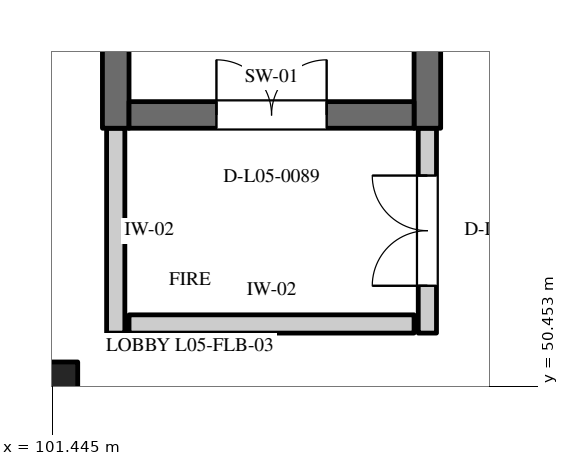
"""IFC4 building model, lengths in metres.
Left out: names, types, materials, properties, quantities, classifications, styles, units other than length and angle.
Written with IfcOpenShell. Run it as: python <this file> out.ifc"""

import sys

from ifc_helpers import new_model, si_unit, direction, frame, frame_2d, origin, origin_2d, place, context, subcontext, project, spatial, rectangle, extrude, element, fill, save


model = new_model("IFC4")
c1 = context("Model", 3, precision=1e-05, world=origin(), true_north=direction((0.0, 1.0)))
c2 = subcontext(c1, "Body", "Model", "MODEL_VIEW")
j1 = project(units=[si_unit("LENGTHUNIT", "METRE"), si_unit("PLANEANGLEUNIT", "RADIAN")], contexts=[c1])
p1 = place(None, origin())
s1 = spatial("IfcSite", under=j1, at=p1, CompositionType="ELEMENT")
p2 = place(p1, origin())
s2 = spatial("IfcBuilding", under=s1, at=p2, CompositionType="ELEMENT")
p3 = place(p2, frame((0.0, 0.0, 22.2)))
s3 = spatial("IfcBuildingStorey", under=s2, at=p3, CompositionType="ELEMENT", Elevation=22.2)
p4 = place(p3, frame((101.4, 50.4, 0.0), z_axis=(0.0, 0.0, 1.0), x_axis=(1.0, 0.0, 0.0)))
e1 = element("IfcColumn", 1, at=p4, inside=s3, PredefinedType="COLUMN", context=c2, shape_type="SweptSolid", body=[
    extrude(rectangle(XDim=0.75, YDim=0.75, at=origin_2d()), origin(), (0.0, 0.0, 1.0), 3.9),
])
for number, where, z_axis, x_axis in (
    (2, (102.275, 53.85, 0.0), (0.0, 0.0, 1.0), (0.0, 1.0, 0.0)),
    (3, (106.375, 53.85, 0.0), (0.0, 0.0, 1.0), (0.0, 1.0, 0.0)),
):
    element("IfcWall", number, at=place(p3, frame(where, z_axis=z_axis, x_axis=x_axis)), inside=s3, PredefinedType="SHEAR", context=c2, shape_type="SweptSolid", body=[
        extrude(rectangle(XDim=10.5, YDim=0.35, at=frame_2d((5.25, 0.0))), origin(), (0.0, 0.0, 1.0), 3.9),
    ])
p5 = place(p3, frame((102.45, 54.025, 0.0), z_axis=(0.0, 0.0, 1.0), x_axis=(1.0, 0.0, 0.0)))
e4 = element("IfcWall", 4, at=p5, inside=s3, PredefinedType="SHEAR", context=c2, shape_type="SweptSolid", body=[
    extrude(rectangle(XDim=3.75, YDim=0.35, at=frame_2d((1.875, 0.0))), origin(), (0.0, 0.0, 1.0), 3.6),
])
p6 = place(p5, frame((1.15, 0.0, 0.0)))
e5 = element("IfcOpeningElement", 5, at=p6, cuts=e4, PredefinedType="OPENING", context=c2, shape_type="SweptSolid", body=[
    extrude(rectangle(XDim=1.45, YDim=2.2, at=frame_2d((0.725, 1.1))), frame((0.0, 0.187, 0.0), z_axis=(0.0, -1.0, 0.0), x_axis=(1.0, 0.0, 0.0)), (0.0, 0.0, 1.0), 0.374),
])
p7 = place(p3, frame((102.275, 51.155, 0.0), z_axis=(0.0, 0.0, 1.0), x_axis=(0.0, 1.0, 0.0)))
e6 = element("IfcWall", 6, at=p7, inside=s3, PredefinedType="STANDARD", context=c2, shape_type="SweptSolid", body=[
    extrude(rectangle(XDim=2.695, YDim=0.24, at=frame_2d((1.348, 0.0))), origin(), (0.0, 0.0, 1.0), 3.6),
])
p8 = place(p3, frame((106.375, 51.155, 0.0), z_axis=(0.0, 0.0, 1.0), x_axis=(0.0, 1.0, 0.0)))
e7 = element("IfcWall", 7, at=p8, inside=s3, PredefinedType="STANDARD", context=c2, shape_type="SweptSolid", body=[
    extrude(rectangle(XDim=2.695, YDim=0.24, at=frame_2d((1.348, 0.0))), origin(), (0.0, 0.0, 1.0), 3.6),
])
p9 = place(p8, frame((0.623, 0.0, 0.0)))
e8 = element("IfcOpeningElement", 8, at=p9, cuts=e7, PredefinedType="OPENING", context=c2, shape_type="SweptSolid", body=[
    extrude(rectangle(XDim=1.45, YDim=2.2, at=frame_2d((0.725, 1.1))), frame((0.0, 0.132, 0.0), z_axis=(0.0, -1.0, 0.0), x_axis=(1.0, 0.0, 0.0)), (0.0, 0.0, 1.0), 0.264),
])
p10 = place(p3, frame((102.45, 51.275, 0.0), z_axis=(0.0, 0.0, 1.0), x_axis=(1.0, 0.0, 0.0)))
e9 = element("IfcWall", 9, at=p10, inside=s3, PredefinedType="STANDARD", context=c2, shape_type="SweptSolid", body=[
    extrude(rectangle(XDim=3.75, YDim=0.24, at=frame_2d((1.875, 0.0))), origin(), (0.0, 0.0, 1.0), 3.6),
])
p11 = place(p6, origin())
e10 = element("IfcDoor", 10, at=p11, inside=s3, OperationType="DOUBLE_DOOR_SINGLE_SWING", PredefinedType="DOOR", context=c2, shape_type="SweptSolid", body=[
    extrude(rectangle(XDim=1.45, YDim=2.2, at=frame_2d((0.725, 1.1))), frame((0.0, 0.025, 0.0), z_axis=(0.0, -1.0, 0.0), x_axis=(1.0, 0.0, 0.0)), (0.0, 0.0, 1.0), 0.05),
])
fill(e5, e10)
p12 = place(p9, origin())
e11 = element("IfcDoor", 11, at=p12, inside=s3, OperationType="DOUBLE_DOOR_SINGLE_SWING", PredefinedType="DOOR", context=c2, shape_type="SweptSolid", body=[
    extrude(rectangle(XDim=1.45, YDim=2.2, at=frame_2d((0.725, 1.1))), frame((0.0, 0.025, 0.0), z_axis=(0.0, -1.0, 0.0), x_axis=(1.0, 0.0, 0.0)), (0.0, 0.0, 1.0), 0.05),
])
fill(e8, e11)
save(model, sys.argv[1])
